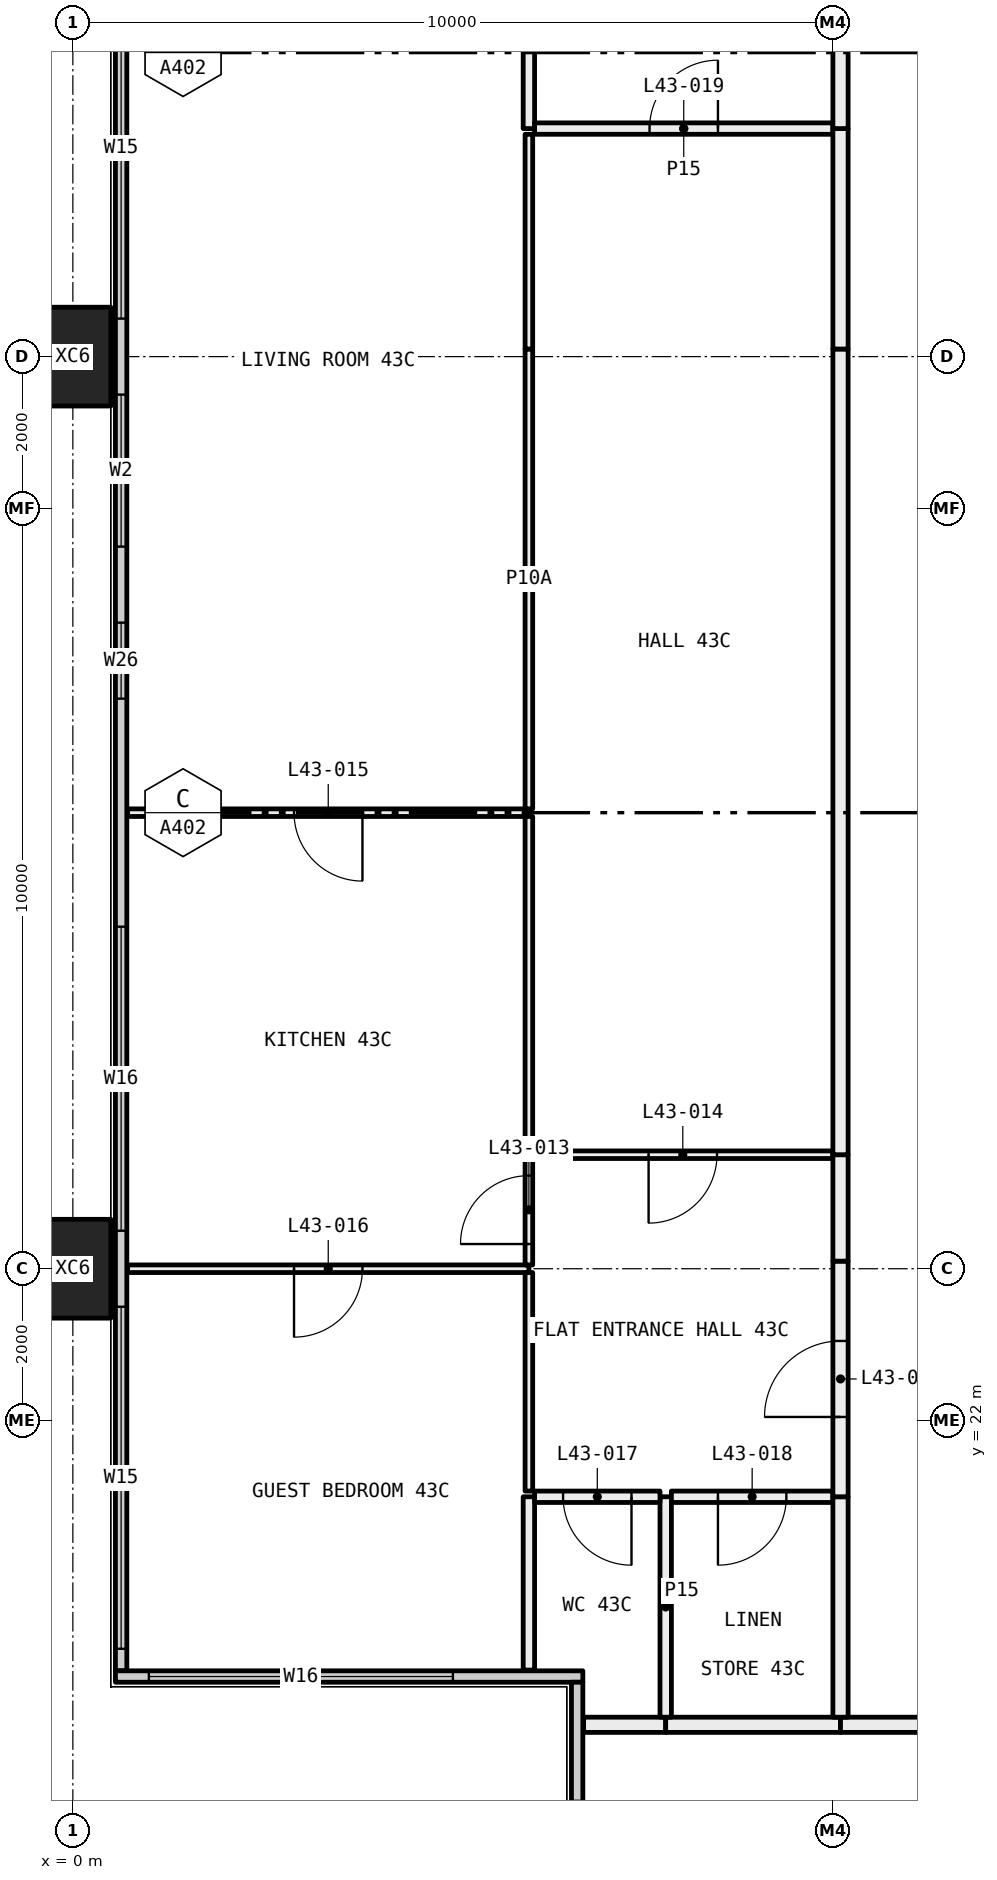
"""IFC4 building model, lengths in metres.
Left out: names, types, materials, properties, quantities, classifications, styles, units other than length and angle.
Written with IfcOpenShell. Run it as: python <this file> out.ifc"""

import sys

from ifc_helpers import new_model, si_unit, direction, frame, frame_2d, origin, origin_2d, place, context, subcontext, project, spatial, rectangle, hollow_rectangle, extrude, element, fill, save


model = new_model("IFC4")
c1 = context("Model", 3, precision=1e-05, world=origin(), true_north=direction((0.0, 1.0)))
c2 = subcontext(c1, "Body", "Model", "MODEL_VIEW")
j1 = project(units=[si_unit("LENGTHUNIT", "METRE"), si_unit("PLANEANGLEUNIT", "RADIAN")], contexts=[c1])
p1 = place(None, origin())
s1 = spatial("IfcSite", under=j1, at=p1, CompositionType="ELEMENT")
p2 = place(p1, origin())
s2 = spatial("IfcBuilding", under=s1, at=p2, CompositionType="ELEMENT")
p3 = place(p2, frame((0.0, 0.0, 165.15)))
s3 = spatial("IfcBuildingStorey", under=s2, at=p3, CompositionType="ELEMENT", Elevation=165.15)
for number, where, z_axis, x_axis in (
    (1, (0.0, 24.0, -0.4), (0.0, 0.0, 1.0), (0.0, 1.0, 0.0)),
    (2, (0.0, 36.0, -0.4), (0.0, 0.0, 1.0), (0.0, 1.0, 0.0)),
):
    element("IfcColumn", number, at=place(p3, frame(where, z_axis=z_axis, x_axis=x_axis)), inside=s3, PredefinedType="COLUMN", context=c2, shape_type="SweptSolid", body=[
        extrude(hollow_rectangle(XDim=1.3, YDim=1.0, WallThickness=0.05, at=origin_2d()), origin(), (0.0, 0.0, 1.0), 3.45),
    ])
p4 = place(p3, frame((0.635, 18.71, 0.0), z_axis=(0.0, 0.0, 1.0), x_axis=(0.0, 1.0, 0.0)))
e3 = element("IfcWall", 3, at=p4, inside=s3, PredefinedType="ELEMENTEDWALL", context=c2, shape_type="SweptSolid", body=[
    extrude(rectangle(XDim=22.58, YDim=0.15, at=frame_2d((11.29, 0.0))), origin(), (0.0, 0.0, 1.0), 3.05),
])
p5 = place(p4, frame((0.29, 0.0, 0.45)))
e4 = element("IfcOpeningElement", 4, at=p5, cuts=e3, PredefinedType="OPENING", context=c2, shape_type="SweptSolid", body=[
    extrude(rectangle(XDim=4.5, YDim=2.55, at=frame_2d((2.25, 1.275))), frame((0.0, 0.085, 0.0), z_axis=(0.0, -1.0, 0.0), x_axis=(1.0, 0.0, 0.0)), (0.0, 0.0, 1.0), 0.17),
])
p6 = place(p4, frame((5.79, 0.0, 0.45)))
e5 = element("IfcOpeningElement", 5, at=p6, cuts=e3, PredefinedType="OPENING", context=c2, shape_type="SweptSolid", body=[
    extrude(rectangle(XDim=4.0, YDim=2.55, at=frame_2d((2.0, 1.275))), frame((0.0, 0.085, 0.0), z_axis=(0.0, -1.0, 0.0), x_axis=(1.0, 0.0, 0.0)), (0.0, 0.0, 1.0), 0.17),
])
p7 = place(p4, frame((12.79, 0.0, 0.45)))
e6 = element("IfcOpeningElement", 6, at=p7, cuts=e3, PredefinedType="OPENING", context=c2, shape_type="SweptSolid", body=[
    extrude(rectangle(XDim=1.0, YDim=2.55, at=frame_2d((0.5, 1.275))), frame((0.0, 0.085, 0.0), z_axis=(0.0, -1.0, 0.0), x_axis=(1.0, 0.0, 0.0)), (0.0, 0.0, 1.0), 0.17),
])
p8 = place(p4, frame((14.79, 0.0, 0.45)))
e7 = element("IfcOpeningElement", 7, at=p8, cuts=e3, PredefinedType="OPENING", context=c2, shape_type="SweptSolid", body=[
    extrude(rectangle(XDim=2.0, YDim=2.55, at=frame_2d((1.0, 1.275))), frame((0.0, 0.085, 0.0), z_axis=(0.0, -1.0, 0.0), x_axis=(1.0, 0.0, 0.0)), (0.0, 0.0, 1.0), 0.17),
])
p9 = place(p4, frame((17.79, 0.0, 0.45)))
e8 = element("IfcOpeningElement", 8, at=p9, cuts=e3, PredefinedType="OPENING", context=c2, shape_type="SweptSolid", body=[
    extrude(rectangle(XDim=4.5, YDim=2.55, at=frame_2d((2.25, 1.275))), frame((0.0, 0.085, 0.0), z_axis=(0.0, -1.0, 0.0), x_axis=(1.0, 0.0, 0.0)), (0.0, 0.0, 1.0), 0.17),
])
p10 = place(p3, frame((0.56, 18.635, 0.0), z_axis=(0.0, 0.0, 1.0), x_axis=(1.0, 0.0, 0.0)))
e9 = element("IfcWall", 9, at=p10, inside=s3, PredefinedType="ELEMENTEDWALL", context=c2, shape_type="SweptSolid", body=[
    extrude(rectangle(XDim=6.15, YDim=0.15, at=frame_2d((3.075, 0.0))), origin(), (0.0, 0.0, 1.0), 3.05),
])
p11 = place(p10, frame((0.44, 0.0, 0.45)))
e10 = element("IfcOpeningElement", 10, at=p11, cuts=e9, PredefinedType="OPENING", context=c2, shape_type="SweptSolid", body=[
    extrude(rectangle(XDim=4.0, YDim=2.55, at=frame_2d((2.0, 1.275))), frame((0.0, 0.085, 0.0), z_axis=(0.0, -1.0, 0.0), x_axis=(1.0, 0.0, 0.0)), (0.0, 0.0, 1.0), 0.17),
])
p12 = place(p3, frame((6.635, 12.71, 0.0), z_axis=(0.0, 0.0, 1.0), x_axis=(0.0, 1.0, 0.0)))
e11 = element("IfcWall", 11, at=p12, inside=s3, PredefinedType="ELEMENTEDWALL", context=c2, shape_type="SweptSolid", body=[
    extrude(rectangle(XDim=5.85, YDim=0.15, at=frame_2d((2.925, 0.0))), origin(), (0.0, 0.0, 1.0), 3.05),
])
p13 = place(p12, frame((0.29, 0.0, 0.45)))
e12 = element("IfcOpeningElement", 12, at=p13, cuts=e11, PredefinedType="OPENING", context=c2, shape_type="SweptSolid", body=[
    extrude(rectangle(XDim=4.0, YDim=2.55, at=frame_2d((2.0, 1.275))), frame((0.0, 0.085, 0.0), z_axis=(0.0, -1.0, 0.0), x_axis=(1.0, 0.0, 0.0)), (0.0, 0.0, 1.0), 0.17),
])
p14 = place(p3, frame((7.8, 18.0, 0.0), z_axis=(0.0, 0.0, 1.0), x_axis=(-1.0, 0.0, 0.0)))
e13 = element("IfcWall", 13, at=p14, inside=s3, PredefinedType="PARTITIONING", context=c2, shape_type="SweptSolid", body=[
    extrude(rectangle(XDim=1.08, YDim=0.2, at=frame_2d((0.54, 0.0))), origin(), (0.0, 0.0, 1.0), 3.05),
])
p15 = place(p3, frame((10.1, 18.0, 0.0), z_axis=(0.0, 0.0, 1.0), x_axis=(-1.0, 0.0, 0.0)))
e14 = element("IfcWall", 14, at=p15, inside=s3, PredefinedType="PARTITIONING", context=c2, shape_type="SweptSolid", body=[
    extrude(rectangle(XDim=2.3, YDim=0.2, at=frame_2d((1.15, 0.0))), origin(), (0.0, 0.0, 1.0), 3.05),
])
p16 = place(p3, frame((12.0, 18.0, 0.0), z_axis=(0.0, 0.0, 1.0), x_axis=(-1.0, 0.0, 0.0)))
e15 = element("IfcWall", 15, at=p16, inside=s3, PredefinedType="PARTITIONING", context=c2, shape_type="SweptSolid", body=[
    extrude(rectangle(XDim=1.9, YDim=0.2, at=frame_2d((0.95, 0.0))), origin(), (0.0, 0.0, 1.0), 3.05),
])
p17 = place(p3, frame((6.0, 24.0, 0.0), z_axis=(0.0, 0.0, 1.0), x_axis=(-1.0, 0.0, 0.0)))
e16 = element("IfcWall", 16, at=p17, inside=s3, PredefinedType="PARTITIONING", context=c2, shape_type="SweptSolid", body=[
    extrude(rectangle(XDim=5.28, YDim=0.1, at=frame_2d((2.64, 0.0))), origin(), (0.0, 0.0, 1.0), 2.45),
])
p18 = place(p17, frame((2.19, 0.0, 0.0)))
e17 = element("IfcOpeningElement", 17, at=p18, cuts=e16, PredefinedType="OPENING", context=c2, shape_type="SweptSolid", body=[
    extrude(rectangle(XDim=0.9, YDim=2.1, at=frame_2d((0.45, 1.05))), frame((0.0, 0.06, 0.0), z_axis=(0.0, -1.0, 0.0), x_axis=(1.0, 0.0, 0.0)), (0.0, 0.0, 1.0), 0.12),
])
p19 = place(p3, frame((6.0, 18.72, 0.0), z_axis=(0.0, 0.0, 1.0), x_axis=(0.0, 1.0, 0.0)))
e18 = element("IfcWall", 18, at=p19, inside=s3, PredefinedType="PARTITIONING", context=c2, shape_type="SweptSolid", body=[
    extrude(rectangle(XDim=2.28, YDim=0.15, at=frame_2d((1.14, 0.0))), origin(), (0.0, 0.0, 1.0), 3.05),
])
p20 = place(p3, frame((6.0, 21.075, 0.0), z_axis=(0.0, 0.0, 1.0), x_axis=(0.0, 1.0, 0.0)))
e19 = element("IfcWall", 19, at=p20, inside=s3, PredefinedType="PARTITIONING", context=c2, shape_type="SweptSolid", body=[
    extrude(rectangle(XDim=2.875, YDim=0.1, at=frame_2d((1.438, 0.0))), origin(), (0.0, 0.0, 1.0), 2.45),
])
p21 = place(p3, frame((6.0, 30.0, 0.0), z_axis=(0.0, 0.0, 1.0), x_axis=(-1.0, 0.0, 0.0)))
e20 = element("IfcWall", 20, at=p21, inside=s3, PredefinedType="PARTITIONING", context=c2, shape_type="SweptSolid", body=[
    extrude(rectangle(XDim=5.28, YDim=0.1, at=frame_2d((2.64, 0.0))), origin(), (0.0, 0.0, 1.0), 3.05),
])
p22 = place(p21, frame((2.19, 0.0, 0.0)))
e21 = element("IfcOpeningElement", 21, at=p22, cuts=e20, PredefinedType="OPENING", context=c2, shape_type="SweptSolid", body=[
    extrude(rectangle(XDim=0.9, YDim=2.1, at=frame_2d((0.45, 1.05))), frame((0.0, 0.06, 0.0), z_axis=(0.0, -1.0, 0.0), x_axis=(1.0, 0.0, 0.0)), (0.0, 0.0, 1.0), 0.12),
])
p23 = place(p3, frame((6.0, 24.05, 0.0), z_axis=(0.0, 0.0, 1.0), x_axis=(0.0, 1.0, 0.0)))
e22 = element("IfcWall", 22, at=p23, inside=s3, PredefinedType="PARTITIONING", context=c2, shape_type="SweptSolid", body=[
    extrude(rectangle(XDim=1.45, YDim=0.1, at=frame_2d((0.725, 0.0))), origin(), (0.0, 0.0, 1.0), 2.45),
])
p24 = place(p23, frame((0.275, 0.0, 0.0)))
e23 = element("IfcOpeningElement", 23, at=p24, cuts=e22, PredefinedType="OPENING", context=c2, shape_type="SweptSolid", body=[
    extrude(rectangle(XDim=0.9, YDim=2.1, at=frame_2d((0.45, 1.05))), frame((0.0, 0.06, 0.0), z_axis=(0.0, -1.0, 0.0), x_axis=(1.0, 0.0, 0.0)), (0.0, 0.0, 1.0), 0.12),
])
p25 = place(p3, frame((6.0, 25.5, 0.0), z_axis=(0.0, 0.0, 1.0), x_axis=(0.0, 1.0, 0.0)))
e24 = element("IfcWall", 24, at=p25, inside=s3, PredefinedType="PARTITIONING", context=c2, shape_type="SweptSolid", body=[
    extrude(rectangle(XDim=4.45, YDim=0.1, at=frame_2d((2.225, 0.0))), origin(), (0.0, 0.0, 1.0), 3.05),
])
p26 = place(p3, frame((6.0, 30.05, 0.0), z_axis=(0.0, 0.0, 1.0), x_axis=(0.0, 1.0, 0.0)))
e25 = element("IfcWall", 25, at=p26, inside=s3, PredefinedType="PARTITIONING", context=c2, shape_type="SweptSolid", body=[
    extrude(rectangle(XDim=6.05, YDim=0.1, at=frame_2d((3.025, 0.0))), origin(), (0.0, 0.0, 1.0), 2.45),
])
p27 = place(p3, frame((6.0, 36.1, 0.0), z_axis=(0.0, 0.0, 1.0), x_axis=(0.0, 1.0, 0.0)))
e26 = element("IfcWall", 26, at=p27, inside=s3, PredefinedType="PARTITIONING", context=c2, shape_type="SweptSolid", body=[
    extrude(rectangle(XDim=2.825, YDim=0.1, at=frame_2d((1.413, 0.0))), origin(), (0.0, 0.0, 1.0), 3.05),
])
p28 = place(p3, frame((6.0, 39.0, 0.0), z_axis=(0.0, 0.0, 1.0), x_axis=(0.0, 1.0, 0.0)))
e27 = element("IfcWall", 27, at=p28, inside=s3, PredefinedType="PARTITIONING", context=c2, shape_type="SweptSolid", body=[
    extrude(rectangle(XDim=2.28, YDim=0.15, at=frame_2d((1.14, 0.0))), origin(), (0.0, 0.0, 1.0), 3.05),
])
p29 = place(p3, frame((7.8, 18.1, 0.0), z_axis=(0.0, 0.0, 1.0), x_axis=(0.0, 1.0, 0.0)))
e28 = element("IfcWall", 28, at=p29, inside=s3, PredefinedType="PARTITIONING", context=c2, shape_type="SweptSolid", body=[
    extrude(rectangle(XDim=2.9, YDim=0.15, at=frame_2d((1.45, 0.0))), origin(), (0.0, 0.0, 1.0), 3.05),
])
p30 = place(p3, frame((7.725, 21.0, 0.0), z_axis=(0.0, 0.0, 1.0), x_axis=(-1.0, 0.0, 0.0)))
e29 = element("IfcWall", 29, at=p30, inside=s3, PredefinedType="PARTITIONING", context=c2, shape_type="SweptSolid", body=[
    extrude(rectangle(XDim=1.65, YDim=0.15, at=frame_2d((0.825, 0.0))), origin(), (0.0, 0.0, 1.0), 3.05),
])
p31 = place(p30, frame((0.375, 0.0, 0.0)))
e30 = element("IfcOpeningElement", 30, at=p31, cuts=e29, PredefinedType="OPENING", context=c2, shape_type="SweptSolid", body=[
    extrude(rectangle(XDim=0.9, YDim=2.1, at=frame_2d((0.45, 1.05))), frame((0.0, 0.085, 0.0), z_axis=(0.0, -1.0, 0.0), x_axis=(1.0, 0.0, 0.0)), (0.0, 0.0, 1.0), 0.17),
])
p32 = place(p3, frame((10.0, 21.0, 0.0), z_axis=(0.0, 0.0, 1.0), x_axis=(-1.0, 0.0, 0.0)))
e31 = element("IfcWall", 31, at=p32, inside=s3, PredefinedType="PARTITIONING", context=c2, shape_type="SweptSolid", body=[
    extrude(rectangle(XDim=2.125, YDim=0.15, at=frame_2d((1.062, 0.0))), origin(), (0.0, 0.0, 1.0), 3.05),
])
p33 = place(p32, frame((0.613, 0.0, 0.0)))
e32 = element("IfcOpeningElement", 32, at=p33, cuts=e31, PredefinedType="OPENING", context=c2, shape_type="SweptSolid", body=[
    extrude(rectangle(XDim=0.9, YDim=2.1, at=frame_2d((0.45, 1.05))), frame((0.0, 0.085, 0.0), z_axis=(0.0, -1.0, 0.0), x_axis=(1.0, 0.0, 0.0)), (0.0, 0.0, 1.0), 0.17),
])
p34 = place(p3, frame((10.1, 18.1, 0.0), z_axis=(0.0, 0.0, 1.0), x_axis=(0.0, 1.0, 0.0)))
e33 = element("IfcWall", 33, at=p34, inside=s3, PredefinedType="PARTITIONING", context=c2, shape_type="SweptSolid", body=[
    extrude(rectangle(XDim=2.9, YDim=0.2, at=frame_2d((1.45, 0.0))), origin(), (0.0, 0.0, 1.0), 3.05),
])
p35 = place(p3, frame((10.0, 25.5, 0.0), z_axis=(0.0, 0.0, 1.0), x_axis=(-1.0, 0.0, 0.0)))
e34 = element("IfcWall", 34, at=p35, inside=s3, PredefinedType="PARTITIONING", context=c2, shape_type="SweptSolid", body=[
    extrude(rectangle(XDim=3.95, YDim=0.1, at=frame_2d((1.975, 0.0))), origin(), (0.0, 0.0, 1.0), 3.05),
])
p36 = place(p35, frame((1.525, 0.0, 0.0)))
e35 = element("IfcOpeningElement", 35, at=p36, cuts=e34, PredefinedType="OPENING", context=c2, shape_type="SweptSolid", body=[
    extrude(rectangle(XDim=0.9, YDim=2.1, at=frame_2d((0.45, 1.05))), frame((0.0, 0.06, 0.0), z_axis=(0.0, -1.0, 0.0), x_axis=(1.0, 0.0, 0.0)), (0.0, 0.0, 1.0), 0.12),
])
p37 = place(p3, frame((10.1, 21.0, 0.0), z_axis=(0.0, 0.0, 1.0), x_axis=(0.0, 1.0, 0.0)))
e36 = element("IfcWall", 36, at=p37, inside=s3, PredefinedType="PARTITIONING", context=c2, shape_type="SweptSolid", body=[
    extrude(rectangle(XDim=3.1, YDim=0.2, at=frame_2d((1.55, 0.0))), origin(), (0.0, 0.0, 1.0), 2.45),
])
p38 = place(p37, frame((1.05, 0.0, 0.0)))
e37 = element("IfcOpeningElement", 37, at=p38, cuts=e36, PredefinedType="OPENING", context=c2, shape_type="SweptSolid", body=[
    extrude(rectangle(XDim=1.0, YDim=2.1, at=frame_2d((0.5, 1.05))), frame((0.0, 0.11, 0.0), z_axis=(0.0, -1.0, 0.0), x_axis=(1.0, 0.0, 0.0)), (0.0, 0.0, 1.0), 0.22),
])
p39 = place(p3, frame((10.1, 24.1, 0.0), z_axis=(0.0, 0.0, 1.0), x_axis=(0.0, 1.0, 0.0)))
e38 = element("IfcWall", 38, at=p39, inside=s3, PredefinedType="PARTITIONING", context=c2, shape_type="SweptSolid", body=[
    extrude(rectangle(XDim=1.4, YDim=0.2, at=frame_2d((0.7, 0.0))), origin(), (0.0, 0.0, 1.0), 3.05),
])
p40 = place(p3, frame((10.0, 39.0, 0.0), z_axis=(0.0, 0.0, 1.0), x_axis=(-1.0, 0.0, 0.0)))
e39 = element("IfcWall", 39, at=p40, inside=s3, PredefinedType="PARTITIONING", context=c2, shape_type="SweptSolid", body=[
    extrude(rectangle(XDim=3.925, YDim=0.15, at=frame_2d((1.962, 0.0))), origin(), (0.0, 0.0, 1.0), 3.05),
])
p41 = place(p40, frame((1.512, 0.0, 0.0)))
e40 = element("IfcOpeningElement", 40, at=p41, cuts=e39, PredefinedType="OPENING", context=c2, shape_type="SweptSolid", body=[
    extrude(rectangle(XDim=0.9, YDim=2.1, at=frame_2d((0.45, 1.05))), frame((0.0, 0.085, 0.0), z_axis=(0.0, -1.0, 0.0), x_axis=(1.0, 0.0, 0.0)), (0.0, 0.0, 1.0), 0.17),
])
p42 = place(p3, frame((10.1, 25.5, 0.0), z_axis=(0.0, 0.0, 1.0), x_axis=(0.0, 1.0, 0.0)))
e41 = element("IfcWall", 41, at=p42, inside=s3, PredefinedType="PARTITIONING", context=c2, shape_type="SweptSolid", body=[
    extrude(rectangle(XDim=10.6, YDim=0.2, at=frame_2d((5.3, 0.0))), origin(), (0.0, 0.0, 1.0), 2.45),
])
for number, where, z_axis, x_axis in (
    (42, (10.1, 36.1, 0.0), (0.0, 0.0, 1.0), (0.0, 1.0, 0.0)),
    (43, (10.1, 39.0, 0.0), (0.0, 0.0, 1.0), (0.0, 1.0, 0.0)),
):
    element("IfcWall", number, at=place(p3, frame(where, z_axis=z_axis, x_axis=x_axis)), inside=s3, PredefinedType="PARTITIONING", context=c2, shape_type="SweptSolid", body=[
        extrude(rectangle(XDim=2.9, YDim=0.2, at=frame_2d((1.45, 0.0))), origin(), (0.0, 0.0, 1.0), 3.05),
    ])
p43 = place(p5, origin())
e44 = element("IfcWindow", 44, at=p43, inside=s3, PartitioningType="SINGLE_PANEL", PredefinedType="WINDOW", context=c2, shape_type="SweptSolid", body=[
    extrude(rectangle(XDim=4.5, YDim=2.55, at=frame_2d((2.25, 1.275))), frame((0.0, 0.03, 0.0), z_axis=(0.0, -1.0, 0.0), x_axis=(1.0, 0.0, 0.0)), (0.0, 0.0, 1.0), 0.06),
])
fill(e4, e44)
p44 = place(p6, origin())
e45 = element("IfcWindow", 45, at=p44, inside=s3, PartitioningType="SINGLE_PANEL", PredefinedType="WINDOW", context=c2, shape_type="SweptSolid", body=[
    extrude(rectangle(XDim=4.0, YDim=2.55, at=frame_2d((2.0, 1.275))), frame((0.0, 0.03, 0.0), z_axis=(0.0, -1.0, 0.0), x_axis=(1.0, 0.0, 0.0)), (0.0, 0.0, 1.0), 0.06),
])
fill(e5, e45)
p45 = place(p7, origin())
e46 = element("IfcWindow", 46, at=p45, inside=s3, PartitioningType="SINGLE_PANEL", PredefinedType="WINDOW", context=c2, shape_type="SweptSolid", body=[
    extrude(rectangle(XDim=1.0, YDim=2.55, at=frame_2d((0.5, 1.275))), frame((0.0, 0.03, 0.0), z_axis=(0.0, -1.0, 0.0), x_axis=(1.0, 0.0, 0.0)), (0.0, 0.0, 1.0), 0.06),
])
fill(e6, e46)
p46 = place(p8, origin())
e47 = element("IfcWindow", 47, at=p46, inside=s3, PartitioningType="SINGLE_PANEL", PredefinedType="WINDOW", context=c2, shape_type="SweptSolid", body=[
    extrude(rectangle(XDim=2.0, YDim=2.55, at=frame_2d((1.0, 1.275))), frame((0.0, 0.03, 0.0), z_axis=(0.0, -1.0, 0.0), x_axis=(1.0, 0.0, 0.0)), (0.0, 0.0, 1.0), 0.06),
])
fill(e7, e47)
p47 = place(p9, origin())
e48 = element("IfcWindow", 48, at=p47, inside=s3, PartitioningType="SINGLE_PANEL", PredefinedType="WINDOW", context=c2, shape_type="SweptSolid", body=[
    extrude(rectangle(XDim=4.5, YDim=2.55, at=frame_2d((2.25, 1.275))), frame((0.0, 0.03, 0.0), z_axis=(0.0, -1.0, 0.0), x_axis=(1.0, 0.0, 0.0)), (0.0, 0.0, 1.0), 0.06),
])
fill(e8, e48)
p48 = place(p11, origin())
e49 = element("IfcWindow", 49, at=p48, inside=s3, PartitioningType="SINGLE_PANEL", PredefinedType="WINDOW", context=c2, shape_type="SweptSolid", body=[
    extrude(rectangle(XDim=4.0, YDim=2.55, at=frame_2d((2.0, 1.275))), frame((0.0, 0.03, 0.0), z_axis=(0.0, -1.0, 0.0), x_axis=(1.0, 0.0, 0.0)), (0.0, 0.0, 1.0), 0.06),
])
fill(e10, e49)
p49 = place(p38, origin())
e50 = element("IfcDoor", 50, at=p49, inside=s3, OperationType="SINGLE_SWING_RIGHT", PredefinedType="DOOR", context=c2, shape_type="SweptSolid", body=[
    extrude(rectangle(XDim=1.0, YDim=2.1, at=frame_2d((0.5, 1.05))), frame((0.0, 0.025, 0.0), z_axis=(0.0, -1.0, 0.0), x_axis=(1.0, 0.0, 0.0)), (0.0, 0.0, 1.0), 0.05),
])
fill(e37, e50)
p50 = place(p24, origin())
e51 = element("IfcDoor", 51, at=p50, inside=s3, OperationType="SINGLE_SWING_RIGHT", PredefinedType="DOOR", context=c2, shape_type="SweptSolid", body=[
    extrude(rectangle(XDim=0.9, YDim=2.1, at=frame_2d((0.45, 1.05))), frame((0.0, 0.025, 0.0), z_axis=(0.0, -1.0, 0.0), x_axis=(1.0, 0.0, 0.0)), (0.0, 0.0, 1.0), 0.05),
])
fill(e23, e51)
p51 = place(p36, origin())
e52 = element("IfcDoor", 52, at=p51, inside=s3, OperationType="SINGLE_SWING_LEFT", PredefinedType="DOOR", context=c2, shape_type="SweptSolid", body=[
    extrude(rectangle(XDim=0.9, YDim=2.1, at=frame_2d((0.45, 1.05))), frame((0.0, 0.025, 0.0), z_axis=(0.0, -1.0, 0.0), x_axis=(1.0, 0.0, 0.0)), (0.0, 0.0, 1.0), 0.05),
])
fill(e35, e52)
p52 = place(p22, origin())
e53 = element("IfcDoor", 53, at=p52, inside=s3, OperationType="SINGLE_SWING_RIGHT", PredefinedType="DOOR", context=c2, shape_type="SweptSolid", body=[
    extrude(rectangle(XDim=0.9, YDim=2.1, at=frame_2d((0.45, 1.05))), frame((0.0, 0.025, 0.0), z_axis=(0.0, -1.0, 0.0), x_axis=(1.0, 0.0, 0.0)), (0.0, 0.0, 1.0), 0.05),
])
fill(e21, e53)
p53 = place(p18, origin())
e54 = element("IfcDoor", 54, at=p53, inside=s3, OperationType="SINGLE_SWING_LEFT", PredefinedType="DOOR", context=c2, shape_type="SweptSolid", body=[
    extrude(rectangle(XDim=0.9, YDim=2.1, at=frame_2d((0.45, 1.05))), frame((0.0, 0.025, 0.0), z_axis=(0.0, -1.0, 0.0), x_axis=(1.0, 0.0, 0.0)), (0.0, 0.0, 1.0), 0.05),
])
fill(e17, e54)
p54 = place(p31, origin())
e55 = element("IfcDoor", 55, at=p54, inside=s3, OperationType="SINGLE_SWING_RIGHT", PredefinedType="DOOR", context=c2, shape_type="SweptSolid", body=[
    extrude(rectangle(XDim=0.9, YDim=2.1, at=frame_2d((0.45, 1.05))), frame((0.0, 0.025, 0.0), z_axis=(0.0, -1.0, 0.0), x_axis=(1.0, 0.0, 0.0)), (0.0, 0.0, 1.0), 0.05),
])
fill(e30, e55)
p55 = place(p33, origin())
e56 = element("IfcDoor", 56, at=p55, inside=s3, OperationType="SINGLE_SWING_LEFT", PredefinedType="DOOR", context=c2, shape_type="SweptSolid", body=[
    extrude(rectangle(XDim=0.9, YDim=2.1, at=frame_2d((0.45, 1.05))), frame((0.0, 0.025, 0.0), z_axis=(0.0, -1.0, 0.0), x_axis=(1.0, 0.0, 0.0)), (0.0, 0.0, 1.0), 0.05),
])
fill(e32, e56)
p56 = place(p41, frame((0.9, 0.0, 0.0), x_axis=(-1.0, 0.0, 0.0)))
e57 = element("IfcDoor", 57, at=p56, inside=s3, OperationType="SINGLE_SWING_LEFT", PredefinedType="DOOR", context=c2, shape_type="SweptSolid", body=[
    extrude(rectangle(XDim=0.9, YDim=2.1, at=frame_2d((0.45, 1.05))), frame((0.0, 0.025, 0.0), z_axis=(0.0, -1.0, 0.0), x_axis=(1.0, 0.0, 0.0)), (0.0, 0.0, 1.0), 0.05),
])
fill(e40, e57)
save(model, sys.argv[1])
